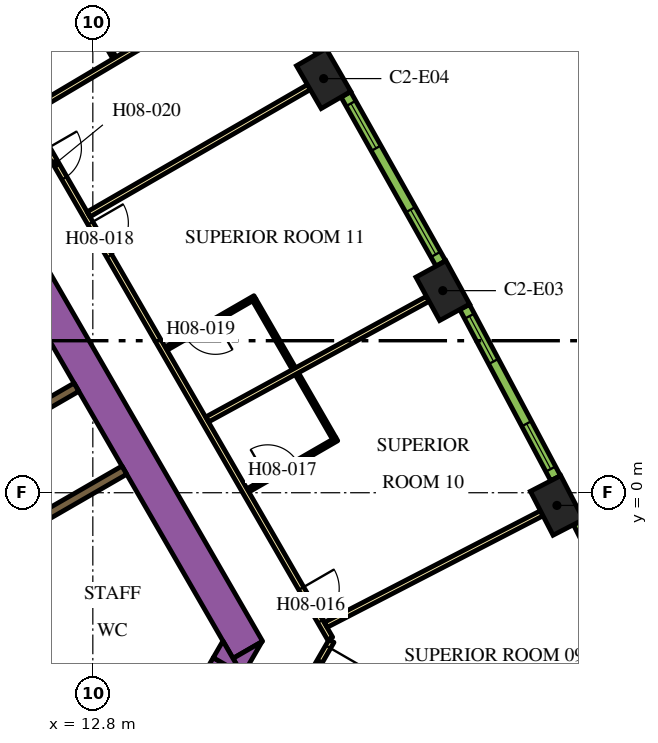
"""IFC4 building model, lengths in metres.
Left out: names, types, materials, properties, quantities, classifications, styles, units other than length and angle.
Written with IfcOpenShell. Run it as: python <this file> out.ifc"""

import sys

from ifc_helpers import new_model, si_unit, direction, frame, frame_2d, origin, origin_2d, place, context, subcontext, project, spatial, polyline, rectangle, outline, extrude, element, fill, save


model = new_model("IFC4")
c1 = context("Model", 3, precision=1e-05, world=origin(), true_north=direction((0.0, 1.0)))
c2 = subcontext(c1, "Body", "Model", "MODEL_VIEW")
j1 = project(units=[si_unit("LENGTHUNIT", "METRE"), si_unit("PLANEANGLEUNIT", "RADIAN")], contexts=[c1])
p1 = place(None, origin())
s1 = spatial("IfcSite", under=j1, at=p1, CompositionType="ELEMENT")
p2 = place(p1, origin())
s2 = spatial("IfcBuilding", under=s1, at=p2, CompositionType="ELEMENT")
p3 = place(p2, frame((0.0, 0.0, 114.9)))
s3 = spatial("IfcBuildingStorey", under=s2, at=p3, CompositionType="ELEMENT", Elevation=114.9)
for number, where, z_axis, x_axis in (
    (1, (25.012, -0.334, 0.0), (0.0, 0.0, 1.0), (-0.459, 0.888, 0.0)),
    (2, (22.009, 5.317, 0.0), (0.0, 0.0, 1.0), (-0.48, 0.877, 0.0)),
    (3, (18.874, 10.897, 0.0), (0.0, 0.0, 1.0), (-0.5, 0.866, 0.0)),
):
    element("IfcColumn", number, at=place(p3, frame(where, z_axis=z_axis, x_axis=x_axis)), inside=s3, PredefinedType="COLUMN", context=c2, shape_type="SweptSolid", body=[
        extrude(rectangle(XDim=1.3, YDim=0.9, at=origin_2d()), origin(), (0.0, 0.0, 1.0), 3.9),
    ])
p4 = place(p3, frame((6.776, 13.364, 0.0), z_axis=(0.0, 0.0, 1.0), x_axis=(0.500004177138, -0.8660229921, 0.0)))
e4 = element("IfcWall", 4, at=p4, inside=s3, PredefinedType="SOLIDWALL", context=c2, shape_type="SweptSolid", body=[
    extrude(rectangle(XDim=20.204, YDim=0.9, at=frame_2d((10.102, 0.0))), origin(), (0.0, 0.0, 1.0), 3.9),
])
p5 = place(p3, origin())
e5 = element("IfcWall", 5, at=p5, inside=s3, PredefinedType="SOLIDWALL", context=c2, shape_type="SweptSolid", body=[
    extrude(outline(polyline([(16.743, -4.8), (16.489, -4.36), (17.251, -3.92), (16.743, -4.8)])), origin(), (0.0, 0.0, 1.0), 3.9),
])
p6 = place(p3, frame((11.943, -12.214, 0.0), z_axis=(0.0, 0.0, 1.0), x_axis=(0.49998092645, 0.866036415623, 0.0)))
e6 = element("IfcWall", 6, at=p6, inside=s3, PredefinedType="SOLIDWALL", context=c2, shape_type="SweptSolid", body=[
    extrude(rectangle(XDim=8.83, YDim=0.9, at=frame_2d((4.415, 0.0))), origin(), (0.0, 0.0, 1.0), 3.9),
])
e7 = element("IfcWall", 7, at=p5, inside=s3, PredefinedType="SOLIDWALL", context=c2, shape_type="SweptSolid", body=[
    extrude(outline(polyline([(16.223, -3.9), (16.732, -4.78), (15.969, -4.34), (16.223, -3.9)])), origin(), (0.0, 0.0, 1.0), 3.9),
])
p7 = place(p3, frame((8.334, -2.964, 0.0), z_axis=(0.0, 0.0, 1.0), x_axis=(0.866016039709, -0.500016218704, 0.0)))
e8 = element("IfcWall", 8, at=p7, inside=s3, PredefinedType="SOLIDWALL", context=c2, shape_type="SweptSolid", body=[
    extrude(rectangle(XDim=7.05, YDim=0.25, at=frame_2d((3.525, 0.0))), origin(), (0.0, 0.0, 1.0), 3.9),
])
p8 = place(p3, frame((10.464, 1.677, 0.0), z_axis=(0.0, 0.0, 1.0), x_axis=(0.86605622881, 0.499946605688, 0.0)))
e9 = element("IfcWall", 9, at=p8, inside=s3, PredefinedType="SOLIDWALL", context=c2, shape_type="SweptSolid", body=[
    extrude(rectangle(XDim=2.2, YDim=0.25, at=frame_2d((1.1, 0.0))), origin(), (0.0, 0.0, 1.0), 3.9),
])
p9 = place(p3, frame((13.629, 0.594, 0.0), z_axis=(0.0, 0.0, 1.0), x_axis=(-0.86602790099, -0.499995674689, 0.0)))
e10 = element("IfcWall", 10, at=p9, inside=s3, PredefinedType="SOLIDWALL", context=c2, shape_type="SweptSolid", body=[
    extrude(rectangle(XDim=3.146, YDim=0.25, at=frame_2d((1.573, 0.0))), origin(), (0.0, 0.0, 1.0), 3.9),
])
p10 = place(p3, frame((19.081, -3.9, 0.0), z_axis=(0.0, 0.0, 1.0), x_axis=(-0.499974327079, -0.866040225545, 0.0)))
e11 = element("IfcWall", 11, at=p10, inside=s3, PredefinedType="PARTITIONING", context=c2, shape_type="SweptSolid", body=[
    extrude(rectangle(XDim=5.258, YDim=0.15, at=frame_2d((2.629, 0.0))), origin(), (0.0, 0.0, 1.0), 2.75),
])
p11 = place(p10, frame((0.18, 0.0, 0.0)))
e12 = element("IfcOpeningElement", 12, at=p11, cuts=e11, PredefinedType="OPENING", context=c2, shape_type="SweptSolid", body=[
    extrude(rectangle(XDim=1.0, YDim=2.1, at=frame_2d((0.5, 1.05))), frame((0.0, 0.085, 0.0), z_axis=(0.0, -1.0, 0.0), x_axis=(1.0, 0.0, 0.0)), (0.0, 0.0, 1.0), 0.17),
])
p12 = place(p3, frame((6.163, 18.475, 0.0), z_axis=(0.0, 0.0, 1.0), x_axis=(0.500001317485, -0.866024643133, 0.0)))
e13 = element("IfcWall", 13, at=p12, inside=s3, PredefinedType="PARTITIONING", context=c2, shape_type="SweptSolid", body=[
    extrude(rectangle(XDim=25.767, YDim=0.15, at=frame_2d((12.883, 0.0))), origin(), (0.0, 0.0, 1.0), 2.75),
])
p13 = place(p12, frame((24.241, 0.0, 0.0)))
e14 = element("IfcOpeningElement", 14, at=p13, cuts=e13, PredefinedType="OPENING", context=c2, shape_type="SweptSolid", body=[
    extrude(rectangle(XDim=1.0, YDim=2.1, at=frame_2d((0.5, 1.05))), frame((0.0, 0.085, 0.0), z_axis=(0.0, -1.0, 0.0), x_axis=(1.0, 0.0, 0.0)), (0.0, 0.0, 1.0), 0.17),
])
p14 = place(p12, frame((13.144, 0.0, 0.0)))
e15 = element("IfcOpeningElement", 15, at=p14, cuts=e13, PredefinedType="OPENING", context=c2, shape_type="SweptSolid", body=[
    extrude(rectangle(XDim=1.0, YDim=2.1, at=frame_2d((0.5, 1.05))), frame((0.0, 0.085, 0.0), z_axis=(0.0, -1.0, 0.0), x_axis=(1.0, 0.0, 0.0)), (0.0, 0.0, 1.0), 0.17),
])
p15 = place(p12, frame((10.874, 0.0, 0.0)))
e16 = element("IfcOpeningElement", 16, at=p15, cuts=e13, PredefinedType="OPENING", context=c2, shape_type="SweptSolid", body=[
    extrude(rectangle(XDim=0.9, YDim=2.1, at=frame_2d((0.45, 1.05))), frame((0.0, 0.085, 0.0), z_axis=(0.0, -1.0, 0.0), x_axis=(1.0, 0.0, 0.0)), (0.0, 0.0, 1.0), 0.17),
])
p16 = place(p12, frame((3.718, 0.0, 0.0)))
e17 = element("IfcOpeningElement", 17, at=p16, cuts=e13, PredefinedType="OPENING", context=c2, shape_type="SweptSolid", body=[
    extrude(rectangle(XDim=1.0, YDim=2.1, at=frame_2d((0.5, 1.05))), frame((0.0, 0.085, 0.0), z_axis=(0.0, -1.0, 0.0), x_axis=(1.0, 0.0, 0.0)), (0.0, 0.0, 1.0), 0.17),
])
p17 = place(p12, frame((2.411, 0.0, 0.0)))
e18 = element("IfcOpeningElement", 18, at=p17, cuts=e13, PredefinedType="OPENING", context=c2, shape_type="SweptSolid", body=[
    extrude(rectangle(XDim=1.0, YDim=2.1, at=frame_2d((0.5, 1.05))), frame((0.0, 0.085, 0.0), z_axis=(0.0, -1.0, 0.0), x_axis=(1.0, 0.0, 0.0)), (0.0, 0.0, 1.0), 0.17),
])
p18 = place(p3, frame((17.379, 13.731, 0.0), z_axis=(0.0, 0.0, 1.0), x_axis=(-0.860132461691, -0.510070728768, 0.0)))
e19 = element("IfcWall", 19, at=p18, inside=s3, PredefinedType="PARTITIONING", context=c2, shape_type="SweptSolid", body=[
    extrude(rectangle(XDim=7.257, YDim=0.15, at=frame_2d((3.628, 0.0))), origin(), (0.0, 0.0, 1.0), 2.75),
])
p19 = place(p3, frame((18.484, 10.672, 0.0), z_axis=(0.0, 0.0, 1.0), x_axis=(-0.866019162053, -0.50001081084, 0.0)))
e20 = element("IfcWall", 20, at=p19, inside=s3, PredefinedType="PARTITIONING", context=c2, shape_type="SweptSolid", body=[
    extrude(rectangle(XDim=6.694, YDim=0.15, at=frame_2d((3.347, 0.0))), origin(), (0.0, 0.0, 1.0), 2.75),
])
p20 = place(p3, frame((21.614, 5.102, 0.0), z_axis=(0.0, 0.0, 1.0), x_axis=(-0.877484555087, -0.479604895287, 0.0)))
e21 = element("IfcWall", 21, at=p20, inside=s3, PredefinedType="PARTITIONING", context=c2, shape_type="SweptSolid", body=[
    extrude(rectangle(XDim=6.611, YDim=0.15, at=frame_2d((3.306, 0.0))), origin(), (0.0, 0.0, 1.0), 2.75),
])
p21 = place(p3, frame((24.613, -0.541, 0.0), z_axis=(0.0, 0.0, 1.0), x_axis=(-0.888459912519, -0.458954228487, 0.0)))
e22 = element("IfcWall", 22, at=p21, inside=s3, PredefinedType="PARTITIONING", context=c2, shape_type="SweptSolid", body=[
    extrude(rectangle(XDim=6.392, YDim=0.15, at=frame_2d((3.196, 0.0))), origin(), (0.0, 0.0, 1.0), 2.75),
])
p22 = place(p3, frame((16.881, 0.061, 0.0), z_axis=(0.0, 0.0, 1.0), x_axis=(0.866019956843, 0.50000943426, 0.0)))
e23 = element("IfcWall", 23, at=p22, inside=s3, PredefinedType="PARTITIONING", context=c2, shape_type="SweptSolid", body=[
    extrude(rectangle(XDim=2.7, YDim=0.1, at=frame_2d((1.35, 0.0))), origin(), (0.0, 0.0, 1.0), 2.75),
])
p23 = place(p22, frame((0.6, 0.0, 0.0)))
e24 = element("IfcOpeningElement", 24, at=p23, cuts=e23, PredefinedType="OPENING", context=c2, shape_type="SweptSolid", body=[
    extrude(rectangle(XDim=0.9, YDim=2.1, at=frame_2d((0.45, 1.05))), frame((0.0, 0.06, 0.0), z_axis=(0.0, -1.0, 0.0), x_axis=(1.0, 0.0, 0.0)), (0.0, 0.0, 1.0), 0.12),
])
p24 = place(p3, frame((19.151, 1.429, 0.0), z_axis=(0.0, 0.0, 1.0), x_axis=(-0.500024377727, 0.866011328839, 0.0)))
e25 = element("IfcWall", 25, at=p24, inside=s3, PredefinedType="PARTITIONING", context=c2, shape_type="SweptSolid", body=[
    extrude(rectangle(XDim=1.96, YDim=0.1, at=frame_2d((0.98, 0.0))), origin(), (0.0, 0.0, 1.0), 2.75),
])
p25 = place(p3, frame((17.066, 5.141, 0.0), z_axis=(0.0, 0.0, 1.0), x_axis=(-0.866059108428, -0.4999416173, 0.0)))
e26 = element("IfcWall", 26, at=p25, inside=s3, PredefinedType="PARTITIONING", context=c2, shape_type="SweptSolid", body=[
    extrude(rectangle(XDim=2.7, YDim=0.1, at=frame_2d((1.35, 0.0))), origin(), (0.0, 0.0, 1.0), 2.75),
])
p26 = place(p25, frame((1.2, 0.0, 0.0)))
e27 = element("IfcOpeningElement", 27, at=p26, cuts=e26, PredefinedType="OPENING", context=c2, shape_type="SweptSolid", body=[
    extrude(rectangle(XDim=0.9, YDim=2.1, at=frame_2d((0.45, 1.05))), frame((0.0, 0.06, 0.0), z_axis=(0.0, -1.0, 0.0), x_axis=(1.0, 0.0, 0.0)), (0.0, 0.0, 1.0), 0.12),
])
p27 = place(p3, frame((17.047, 5.073, 0.0), z_axis=(0.0, 0.0, 1.0), x_axis=(0.500008976872, -0.866020220923, 0.0)))
e28 = element("IfcWall", 28, at=p27, inside=s3, PredefinedType="PARTITIONING", context=c2, shape_type="SweptSolid", body=[
    extrude(rectangle(XDim=2.09, YDim=0.1, at=frame_2d((1.045, 0.0))), origin(), (0.0, 0.0, 1.0), 2.75),
])
p28 = place(p3, frame((12.372, 13.171, 0.0), z_axis=(0.0, 0.0, 1.0), x_axis=(0.500044573643, -0.86599966765, 0.0)))
e29 = element("IfcWall", 29, at=p28, inside=s3, PredefinedType="PARTITIONING", context=c2, shape_type="SweptSolid", body=[
    extrude(rectangle(XDim=1.99, YDim=0.1, at=frame_2d((0.995, 0.0))), origin(), (0.0, 0.0, 1.0), 2.75),
])
p29 = place(p3, frame((27.864, -5.336, 0.0), z_axis=(0.0, 0.0, 1.0), x_axis=(-0.448534297211, 0.893765620409, 0.0)))
e30 = element("IfcWall", 30, at=p29, inside=s3, PredefinedType="SOLIDWALL", context=c2, shape_type="SweptSolid", body=[
    extrude(rectangle(XDim=5.1, YDim=0.29, at=frame_2d((2.55, 0.0))), origin(), (0.0, 0.0, 1.0), 3.65),
])
p30 = place(p29, frame((0.272, 0.0, 0.9)))
e31 = element("IfcOpeningElement", 31, at=p30, cuts=e30, PredefinedType="OPENING", context=c2, shape_type="SweptSolid", body=[
    extrude(rectangle(XDim=1.35, YDim=2.15, at=frame_2d((0.675, 1.075))), frame((0.0, 0.155, 0.0), z_axis=(0.0, -1.0, 0.0), x_axis=(1.0, 0.0, 0.0)), (0.0, 0.0, 1.0), 0.31),
])
p31 = place(p29, frame((3.478, 0.0, 0.9)))
e32 = element("IfcOpeningElement", 32, at=p31, cuts=e30, PredefinedType="OPENING", context=c2, shape_type="SweptSolid", body=[
    extrude(rectangle(XDim=1.35, YDim=2.15, at=frame_2d((0.675, 1.075))), frame((0.0, 0.155, 0.0), z_axis=(0.0, -1.0, 0.0), x_axis=(1.0, 0.0, 0.0)), (0.0, 0.0, 1.0), 0.31),
])
p32 = place(p3, frame((24.977, 0.383, 0.0), z_axis=(0.0, 0.0, 1.0), x_axis=(-0.469323203119, 0.883026461106, 0.0)))
e33 = element("IfcWall", 33, at=p32, inside=s3, PredefinedType="SOLIDWALL", context=c2, shape_type="SweptSolid", body=[
    extrude(rectangle(XDim=5.101, YDim=0.29, at=frame_2d((2.55, 0.0))), origin(), (0.0, 0.0, 1.0), 3.65),
])
p33 = place(p32, frame((0.273, 0.0, 0.9)))
e34 = element("IfcOpeningElement", 34, at=p33, cuts=e33, PredefinedType="OPENING", context=c2, shape_type="SweptSolid", body=[
    extrude(rectangle(XDim=1.35, YDim=2.15, at=frame_2d((0.675, 1.075))), frame((0.0, 0.155, 0.0), z_axis=(0.0, -1.0, 0.0), x_axis=(1.0, 0.0, 0.0)), (0.0, 0.0, 1.0), 0.31),
])
p34 = place(p32, frame((3.478, 0.0, 0.9)))
e35 = element("IfcOpeningElement", 35, at=p34, cuts=e33, PredefinedType="OPENING", context=c2, shape_type="SweptSolid", body=[
    extrude(rectangle(XDim=1.35, YDim=2.15, at=frame_2d((0.675, 1.075))), frame((0.0, 0.155, 0.0), z_axis=(0.0, -1.0, 0.0), x_axis=(1.0, 0.0, 0.0)), (0.0, 0.0, 1.0), 0.31),
])
p35 = place(p3, frame((21.956, 6.033, 0.0), z_axis=(0.0, 0.0, 1.0), x_axis=(-0.48983164787, 0.87181704316, 0.0)))
e36 = element("IfcWall", 36, at=p35, inside=s3, PredefinedType="SOLIDWALL", context=c2, shape_type="SweptSolid", body=[
    extrude(rectangle(XDim=5.1, YDim=0.29, at=frame_2d((2.55, 0.0))), origin(), (0.0, 0.0, 1.0), 3.65),
])
p36 = place(p35, frame((0.273, 0.0, 0.9)))
e37 = element("IfcOpeningElement", 37, at=p36, cuts=e36, PredefinedType="OPENING", context=c2, shape_type="SweptSolid", body=[
    extrude(rectangle(XDim=1.35, YDim=2.15, at=frame_2d((0.675, 1.075))), frame((0.0, 0.155, 0.0), z_axis=(0.0, -1.0, 0.0), x_axis=(1.0, 0.0, 0.0)), (0.0, 0.0, 1.0), 0.31),
])
p37 = place(p35, frame((3.478, 0.0, 0.9)))
e38 = element("IfcOpeningElement", 38, at=p37, cuts=e36, PredefinedType="OPENING", context=c2, shape_type="SweptSolid", body=[
    extrude(rectangle(XDim=1.35, YDim=2.15, at=frame_2d((0.675, 1.075))), frame((0.0, 0.155, 0.0), z_axis=(0.0, -1.0, 0.0), x_axis=(1.0, 0.0, 0.0)), (0.0, 0.0, 1.0), 0.31),
])
p38 = place(p3, frame((18.805, 11.611, 0.0), z_axis=(0.0, 0.0, 1.0), x_axis=(-0.510054281659, 0.860142214847, 0.0)))
e39 = element("IfcWall", 39, at=p38, inside=s3, PredefinedType="SOLIDWALL", context=c2, shape_type="SweptSolid", body=[
    extrude(rectangle(XDim=5.101, YDim=0.29, at=frame_2d((2.55, 0.0))), origin(), (0.0, 0.0, 1.0), 3.65),
])
p39 = place(p38, frame((0.273, 0.0, 0.9)))
e40 = element("IfcOpeningElement", 40, at=p39, cuts=e39, PredefinedType="OPENING", context=c2, shape_type="SweptSolid", body=[
    extrude(rectangle(XDim=1.35, YDim=2.15, at=frame_2d((0.675, 1.075))), frame((0.0, 0.155, 0.0), z_axis=(0.0, -1.0, 0.0), x_axis=(1.0, 0.0, 0.0)), (0.0, 0.0, 1.0), 0.31),
])
p40 = place(p38, frame((3.478, 0.0, 0.9)))
e41 = element("IfcOpeningElement", 41, at=p40, cuts=e39, PredefinedType="OPENING", context=c2, shape_type="SweptSolid", body=[
    extrude(rectangle(XDim=1.35, YDim=2.15, at=frame_2d((0.675, 1.075))), frame((0.0, 0.155, 0.0), z_axis=(0.0, -1.0, 0.0), x_axis=(1.0, 0.0, 0.0)), (0.0, 0.0, 1.0), 0.31),
])
p41 = place(p11, origin())
e42 = element("IfcDoor", 42, at=p41, inside=s3, OperationType="SINGLE_SWING_LEFT", PredefinedType="DOOR", context=c2, shape_type="SweptSolid", body=[
    extrude(rectangle(XDim=1.0, YDim=2.1, at=frame_2d((0.5, 1.05))), frame((0.0, 0.025, 0.0), z_axis=(0.0, -1.0, 0.0), x_axis=(1.0, 0.0, 0.0)), (0.0, 0.0, 1.0), 0.05),
])
fill(e12, e42)
p42 = place(p13, origin())
e43 = element("IfcDoor", 43, at=p42, inside=s3, OperationType="SINGLE_SWING_RIGHT", PredefinedType="DOOR", context=c2, shape_type="SweptSolid", body=[
    extrude(rectangle(XDim=1.0, YDim=2.1, at=frame_2d((0.5, 1.05))), frame((0.0, 0.025, 0.0), z_axis=(0.0, -1.0, 0.0), x_axis=(1.0, 0.0, 0.0)), (0.0, 0.0, 1.0), 0.05),
])
fill(e14, e43)
p43 = place(p23, origin())
e44 = element("IfcDoor", 44, at=p43, inside=s3, OperationType="SINGLE_SWING_LEFT", PredefinedType="DOOR", context=c2, shape_type="SweptSolid", body=[
    extrude(rectangle(XDim=0.9, YDim=2.1, at=frame_2d((0.45, 1.05))), frame((0.0, 0.025, 0.0), z_axis=(0.0, -1.0, 0.0), x_axis=(1.0, 0.0, 0.0)), (0.0, 0.0, 1.0), 0.05),
])
fill(e24, e44)
p44 = place(p14, origin())
e45 = element("IfcDoor", 45, at=p44, inside=s3, OperationType="SINGLE_SWING_LEFT", PredefinedType="DOOR", context=c2, shape_type="SweptSolid", body=[
    extrude(rectangle(XDim=1.0, YDim=2.1, at=frame_2d((0.5, 1.05))), frame((0.0, 0.025, 0.0), z_axis=(0.0, -1.0, 0.0), x_axis=(1.0, 0.0, 0.0)), (0.0, 0.0, 1.0), 0.05),
])
fill(e15, e45)
p45 = place(p26, origin())
e46 = element("IfcDoor", 46, at=p45, inside=s3, OperationType="SINGLE_SWING_LEFT", PredefinedType="DOOR", context=c2, shape_type="SweptSolid", body=[
    extrude(rectangle(XDim=0.9, YDim=2.1, at=frame_2d((0.45, 1.05))), frame((0.0, 0.025, 0.0), z_axis=(0.0, -1.0, 0.0), x_axis=(1.0, 0.0, 0.0)), (0.0, 0.0, 1.0), 0.05),
])
fill(e27, e46)
p46 = place(p15, origin())
e47 = element("IfcDoor", 47, at=p46, inside=s3, OperationType="SINGLE_SWING_RIGHT", PredefinedType="DOOR", context=c2, shape_type="SweptSolid", body=[
    extrude(rectangle(XDim=0.9, YDim=2.1, at=frame_2d((0.45, 1.05))), frame((0.0, 0.025, 0.0), z_axis=(0.0, -1.0, 0.0), x_axis=(1.0, 0.0, 0.0)), (0.0, 0.0, 1.0), 0.05),
])
fill(e16, e47)
p47 = place(p33, origin())
e48 = element("IfcWindow", 48, at=p47, inside=s3, PartitioningType="DOUBLE_PANEL_VERTICAL", PredefinedType="WINDOW", context=c2, shape_type="SweptSolid", body=[
    extrude(rectangle(XDim=1.35, YDim=2.15, at=frame_2d((0.675, 1.075))), frame((0.0, 0.015, 0.0), z_axis=(0.0, -1.0, 0.0), x_axis=(1.0, 0.0, 0.0)), (0.0, 0.0, 1.0), 0.06),
])
fill(e34, e48)
p48 = place(p34, origin())
e49 = element("IfcWindow", 49, at=p48, inside=s3, PartitioningType="DOUBLE_PANEL_VERTICAL", PredefinedType="WINDOW", context=c2, shape_type="SweptSolid", body=[
    extrude(rectangle(XDim=1.35, YDim=2.15, at=frame_2d((0.675, 1.075))), frame((0.0, 0.015, 0.0), z_axis=(0.0, -1.0, 0.0), x_axis=(1.0, 0.0, 0.0)), (0.0, 0.0, 1.0), 0.06),
])
fill(e35, e49)
p49 = place(p36, origin())
e50 = element("IfcWindow", 50, at=p49, inside=s3, PartitioningType="DOUBLE_PANEL_VERTICAL", PredefinedType="WINDOW", context=c2, shape_type="SweptSolid", body=[
    extrude(rectangle(XDim=1.35, YDim=2.15, at=frame_2d((0.675, 1.075))), frame((0.0, 0.015, 0.0), z_axis=(0.0, -1.0, 0.0), x_axis=(1.0, 0.0, 0.0)), (0.0, 0.0, 1.0), 0.06),
])
fill(e37, e50)
p50 = place(p37, origin())
e51 = element("IfcWindow", 51, at=p50, inside=s3, PartitioningType="DOUBLE_PANEL_VERTICAL", PredefinedType="WINDOW", context=c2, shape_type="SweptSolid", body=[
    extrude(rectangle(XDim=1.35, YDim=2.15, at=frame_2d((0.675, 1.075))), frame((0.0, 0.015, 0.0), z_axis=(0.0, -1.0, 0.0), x_axis=(1.0, 0.0, 0.0)), (0.0, 0.0, 1.0), 0.06),
])
fill(e38, e51)
save(model, sys.argv[1])
